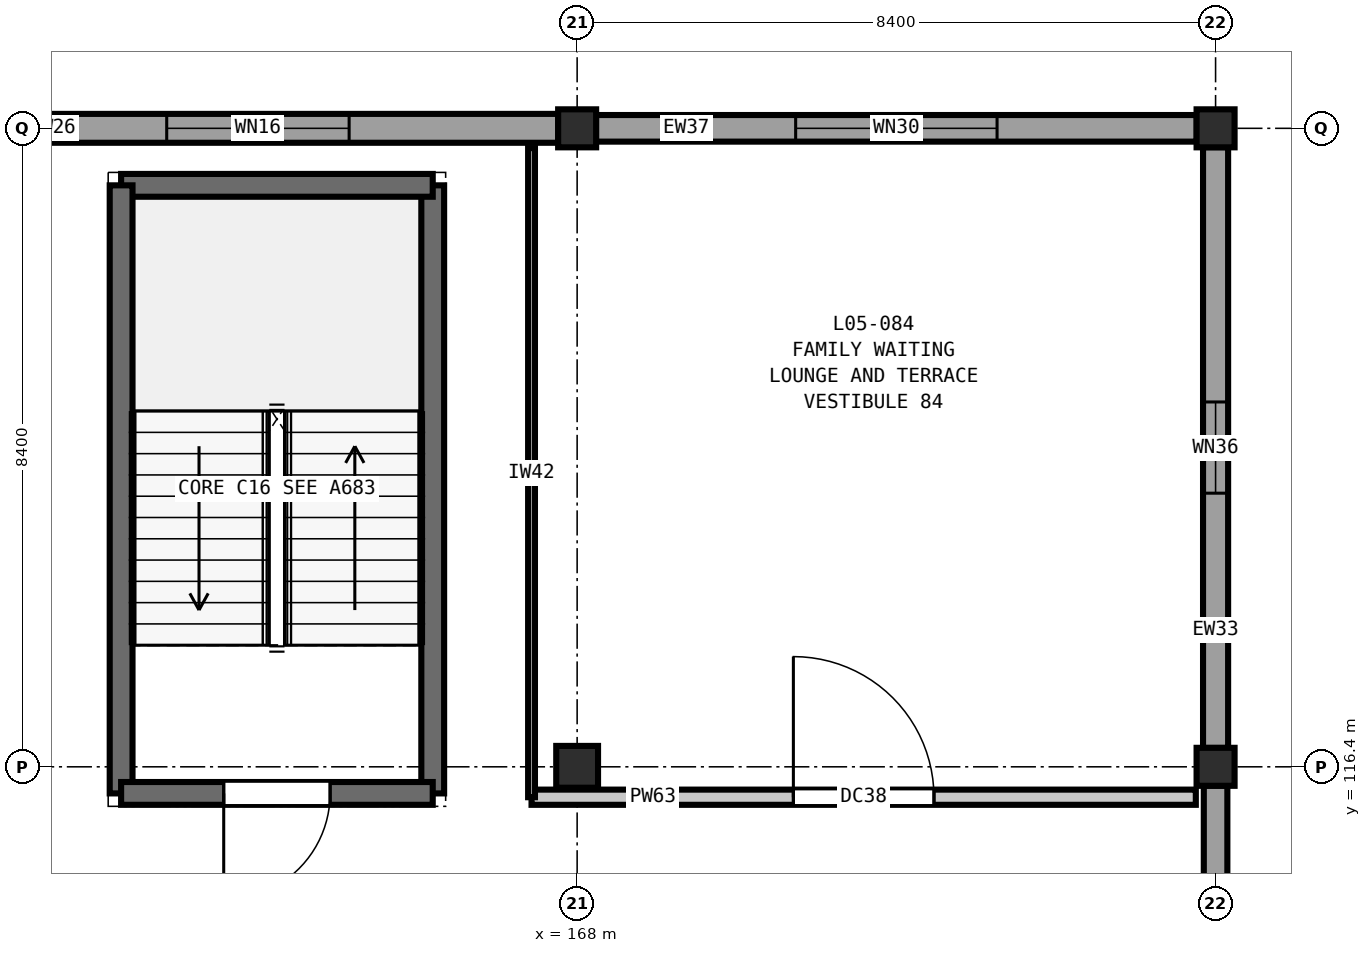
"""IFC4 building model, lengths in metres.
Left out: names, types, materials, properties, quantities, classifications, styles, units other than length and angle.
Written with IfcOpenShell. Run it as: python <this file> out.ifc"""

import sys

from ifc_helpers import new_model, si_unit, direction, frame, frame_2d, origin, origin_2d, place, context, subcontext, project, spatial, rectangle, extrude, element, fill, save


model = new_model("IFC4")
c1 = context("Model", 3, precision=1e-05, world=origin(), true_north=direction((0.0, 1.0)))
c2 = subcontext(c1, "Body", "Model", "MODEL_VIEW")
j1 = project(units=[si_unit("LENGTHUNIT", "METRE"), si_unit("PLANEANGLEUNIT", "RADIAN")], contexts=[c1])
p1 = place(None, origin())
s1 = spatial("IfcSite", under=j1, at=p1, CompositionType="ELEMENT")
p2 = place(p1, origin())
s2 = spatial("IfcBuilding", under=s1, at=p2, CompositionType="ELEMENT")
p3 = place(p2, frame((0.0, 0.0, 24.6)))
s3 = spatial("IfcBuildingStorey", under=s2, at=p3, CompositionType="ELEMENT", Elevation=24.6)
p4 = place(p3, frame((168.0, 116.4, 0.0), z_axis=(0.0, 0.0, 1.0), x_axis=(1.0, 0.0, 0.0)))
e1 = element("IfcColumn", 1, at=p4, inside=s3, PredefinedType="COLUMN", context=c2, shape_type="SweptSolid", body=[
    extrude(rectangle(XDim=0.55, YDim=0.55, at=origin_2d()), origin(), (0.0, 0.0, 1.0), 4.2),
])
for number, where, z_axis, x_axis in (
    (2, (168.0, 124.8, 0.0), (0.0, 0.0, 1.0), (1.0, 0.0, 0.0)),
    (3, (176.4, 116.4, 0.0), (0.0, 0.0, 1.0), (1.0, 0.0, 0.0)),
    (4, (176.4, 124.8, 0.0), (0.0, 0.0, 1.0), (1.0, 0.0, 0.0)),
):
    element("IfcColumn", number, at=place(p3, frame(where, z_axis=z_axis, x_axis=x_axis)), inside=s3, PredefinedType="COLUMN", context=c2, shape_type="SweptSolid", body=[
        extrude(rectangle(XDim=0.5, YDim=0.5, at=origin_2d()), origin(), (0.0, 0.0, 1.0), 4.2),
    ])
p5 = place(p3, frame((159.848, 124.8, 0.0), z_axis=(0.0, 0.0, 1.0), x_axis=(1.0, 0.0, 0.0)))
e5 = element("IfcWall", 5, at=p5, inside=s3, PredefinedType="SOLIDWALL", context=c2, shape_type="SweptSolid", body=[
    extrude(rectangle(XDim=7.904, YDim=0.38, at=frame_2d((3.952, 0.0))), origin(), (0.0, 0.0, 1.0), 3.48),
])
p6 = place(p5, frame((2.752, 0.0, 0.9)))
e6 = element("IfcOpeningElement", 6, at=p6, cuts=e5, PredefinedType="OPENING", context=c2, shape_type="SweptSolid", body=[
    extrude(rectangle(XDim=2.4, YDim=1.95, at=frame_2d((1.2, 0.975))), frame((0.0, 0.2, 0.0), z_axis=(0.0, -1.0, 0.0), x_axis=(1.0, 0.0, 0.0)), (0.0, 0.0, 1.0), 0.4),
])
p7 = place(p3, frame((168.248, 124.8, 0.0), z_axis=(0.0, 0.0, 1.0), x_axis=(1.0, 0.0, 0.0)))
e7 = element("IfcWall", 7, at=p7, inside=s3, PredefinedType="SOLIDWALL", context=c2, shape_type="SweptSolid", body=[
    extrude(rectangle(XDim=7.904, YDim=0.35, at=frame_2d((3.952, 0.0))), origin(), (0.0, 0.0, 1.0), 3.48),
])
p8 = place(p7, frame((2.627, 0.0, 0.9)))
e8 = element("IfcOpeningElement", 8, at=p8, cuts=e7, PredefinedType="OPENING", context=c2, shape_type="SweptSolid", body=[
    extrude(rectangle(XDim=2.65, YDim=1.95, at=frame_2d((1.325, 0.975))), frame((0.0, 0.185, 0.0), z_axis=(0.0, -1.0, 0.0), x_axis=(1.0, 0.0, 0.0)), (0.0, 0.0, 1.0), 0.37),
])
p9 = place(p3, frame((176.4, 124.552, 0.0), z_axis=(0.0, 0.0, 1.0), x_axis=(0.0, -1.0, 0.0)))
e9 = element("IfcWall", 9, at=p9, inside=s3, PredefinedType="SOLIDWALL", context=c2, shape_type="SweptSolid", body=[
    extrude(rectangle(XDim=7.904, YDim=0.33, at=frame_2d((3.952, 0.0))), origin(), (0.0, 0.0, 1.0), 3.48),
])
p10 = place(p9, frame((3.352, 0.0, 0.9)))
e10 = element("IfcOpeningElement", 10, at=p10, cuts=e9, PredefinedType="OPENING", context=c2, shape_type="SweptSolid", body=[
    extrude(rectangle(XDim=1.2, YDim=2.15, at=frame_2d((0.6, 1.075))), frame((0.0, 0.175, 0.0), z_axis=(0.0, -1.0, 0.0), x_axis=(1.0, 0.0, 0.0)), (0.0, 0.0, 1.0), 0.35),
])
p11 = place(p3, frame((176.4, 116.152, 0.0), z_axis=(0.0, 0.0, 1.0), x_axis=(0.0, -1.0, 0.0)))
e11 = element("IfcWall", 11, at=p11, inside=s3, PredefinedType="SOLIDWALL", context=c2, shape_type="SweptSolid", body=[
    extrude(rectangle(XDim=6.704, YDim=0.31, at=frame_2d((3.352, 0.0))), origin(), (0.0, 0.0, 1.0), 3.48),
])
p12 = place(p11, frame((3.621, 0.0, 0.9)))
e12 = element("IfcOpeningElement", 12, at=p12, cuts=e11, PredefinedType="OPENING", context=c2, shape_type="SweptSolid", body=[
    extrude(rectangle(XDim=1.4, YDim=2.15, at=frame_2d((0.7, 1.075))), frame((0.0, 0.165, 0.0), z_axis=(0.0, -1.0, 0.0), x_axis=(1.0, 0.0, 0.0)), (0.0, 0.0, 1.0), 0.33),
])
p13 = place(p3, frame((166.1, 116.05, 0.0), z_axis=(0.0, 0.0, 1.0), x_axis=(0.0, 1.0, 0.0)))
e13 = element("IfcWall", 13, at=p13, inside=s3, PredefinedType="SHEAR", context=c2, shape_type="SweptSolid", body=[
    extrude(rectangle(XDim=8.0, YDim=0.3, at=frame_2d((4.0, 0.0))), origin(), (0.0, 0.0, 1.0), 4.2),
])
p14 = place(p3, frame((166.1, 124.05, 0.0), z_axis=(0.0, 0.0, 1.0), x_axis=(-1.0, 0.0, 0.0)))
e14 = element("IfcWall", 14, at=p14, inside=s3, PredefinedType="SHEAR", context=c2, shape_type="SweptSolid", body=[
    extrude(rectangle(XDim=4.1, YDim=0.3, at=frame_2d((2.05, 0.0))), origin(), (0.0, 0.0, 1.0), 4.2),
])
p15 = place(p3, frame((162.0, 124.05, 0.0), z_axis=(0.0, 0.0, 1.0), x_axis=(0.0, -1.0, 0.0)))
e15 = element("IfcWall", 15, at=p15, inside=s3, PredefinedType="SHEAR", context=c2, shape_type="SweptSolid", body=[
    extrude(rectangle(XDim=8.0, YDim=0.3, at=frame_2d((4.0, 0.0))), origin(), (0.0, 0.0, 1.0), 4.2),
])
p16 = place(p3, frame((162.0, 116.05, 0.0), z_axis=(0.0, 0.0, 1.0), x_axis=(1.0, 0.0, 0.0)))
e16 = element("IfcWall", 16, at=p16, inside=s3, PredefinedType="SHEAR", context=c2, shape_type="SweptSolid", body=[
    extrude(rectangle(XDim=4.1, YDim=0.3, at=frame_2d((2.05, 0.0))), origin(), (0.0, 0.0, 1.0), 4.2),
])
p17 = place(p16, frame((1.35, 0.0, 0.0)))
e17 = element("IfcOpeningElement", 17, at=p17, cuts=e16, PredefinedType="OPENING", context=c2, shape_type="SweptSolid", body=[
    extrude(rectangle(XDim=1.4, YDim=2.2, at=frame_2d((0.7, 1.1))), frame((0.0, 0.16, 0.0), z_axis=(0.0, -1.0, 0.0), x_axis=(1.0, 0.0, 0.0)), (0.0, 0.0, 1.0), 0.32),
])
p18 = place(p3, frame((167.4, 116.0, 0.0), z_axis=(0.0, 0.0, 1.0), x_axis=(1.0, 0.0, 0.0)))
e18 = element("IfcWall", 18, at=p18, inside=s3, PredefinedType="PARTITIONING", context=c2, shape_type="SweptSolid", body=[
    extrude(rectangle(XDim=8.74, YDim=0.2, at=frame_2d((4.37, 0.0))), origin(), (0.0, 0.0, 1.0), 3.92),
])
p19 = place(p18, frame((3.445, 0.0, 0.0)))
e19 = element("IfcOpeningElement", 19, at=p19, cuts=e18, PredefinedType="OPENING", context=c2, shape_type="SweptSolid", body=[
    extrude(rectangle(XDim=1.85, YDim=2.3, at=frame_2d((0.925, 1.15))), frame((0.0, 0.11, 0.0), z_axis=(0.0, -1.0, 0.0), x_axis=(1.0, 0.0, 0.0)), (0.0, 0.0, 1.0), 0.22),
])
p20 = place(p3, frame((167.4, 116.0, 0.0), z_axis=(0.0, 0.0, 1.0), x_axis=(0.0, 1.0, 0.0)))
e20 = element("IfcWall", 20, at=p20, inside=s3, PredefinedType="PARTITIONING", context=c2, shape_type="SweptSolid", body=[
    extrude(rectangle(XDim=8.54, YDim=0.09, at=frame_2d((4.27, 0.0))), origin(), (0.0, 0.0, 1.0), 3.92),
])
p21 = place(p6, origin())
e21 = element("IfcWindow", 21, at=p21, inside=s3, PartitioningType="DOUBLE_PANEL_VERTICAL", PredefinedType="WINDOW", context=c2, shape_type="SweptSolid", body=[
    extrude(rectangle(XDim=2.4, YDim=1.95, at=frame_2d((1.2, 0.975))), frame((0.0, 0.03, 0.0), z_axis=(0.0, -1.0, 0.0), x_axis=(1.0, 0.0, 0.0)), (0.0, 0.0, 1.0), 0.06),
])
fill(e6, e21)
p22 = place(p8, origin())
e22 = element("IfcWindow", 22, at=p22, inside=s3, PartitioningType="DOUBLE_PANEL_VERTICAL", PredefinedType="WINDOW", context=c2, shape_type="SweptSolid", body=[
    extrude(rectangle(XDim=2.65, YDim=1.95, at=frame_2d((1.325, 0.975))), frame((0.0, 0.03, 0.0), z_axis=(0.0, -1.0, 0.0), x_axis=(1.0, 0.0, 0.0)), (0.0, 0.0, 1.0), 0.06),
])
fill(e8, e22)
p23 = place(p10, origin())
e23 = element("IfcWindow", 23, at=p23, inside=s3, PartitioningType="SINGLE_PANEL", PredefinedType="WINDOW", context=c2, shape_type="SweptSolid", body=[
    extrude(rectangle(XDim=1.2, YDim=2.15, at=frame_2d((0.6, 1.075))), frame((0.0, 0.03, 0.0), z_axis=(0.0, -1.0, 0.0), x_axis=(1.0, 0.0, 0.0)), (0.0, 0.0, 1.0), 0.06),
])
fill(e10, e23)
p24 = place(p17, frame((1.4, 0.0, 0.0), z_axis=(0.0, 0.0, 1.0), x_axis=(-1.0, 0.0, 0.0)))
e24 = element("IfcDoor", 24, at=p24, inside=s3, OperationType="SINGLE_SWING_RIGHT", PredefinedType="DOOR", context=c2, shape_type="SweptSolid", body=[
    extrude(rectangle(XDim=1.4, YDim=2.2, at=frame_2d((0.7, 1.1))), frame((0.0, 0.025, 0.0), z_axis=(0.0, -1.0, 0.0), x_axis=(1.0, 0.0, 0.0)), (0.0, 0.0, 1.0), 0.05),
])
fill(e17, e24)
p25 = place(p19, origin())
e25 = element("IfcDoor", 25, at=p25, inside=s3, OperationType="SINGLE_SWING_LEFT", PredefinedType="DOOR", context=c2, shape_type="SweptSolid", body=[
    extrude(rectangle(XDim=1.85, YDim=2.3, at=frame_2d((0.925, 1.15))), frame((0.0, 0.025, 0.0), z_axis=(0.0, -1.0, 0.0), x_axis=(1.0, 0.0, 0.0)), (0.0, 0.0, 1.0), 0.05),
])
fill(e19, e25)
save(model, sys.argv[1])
